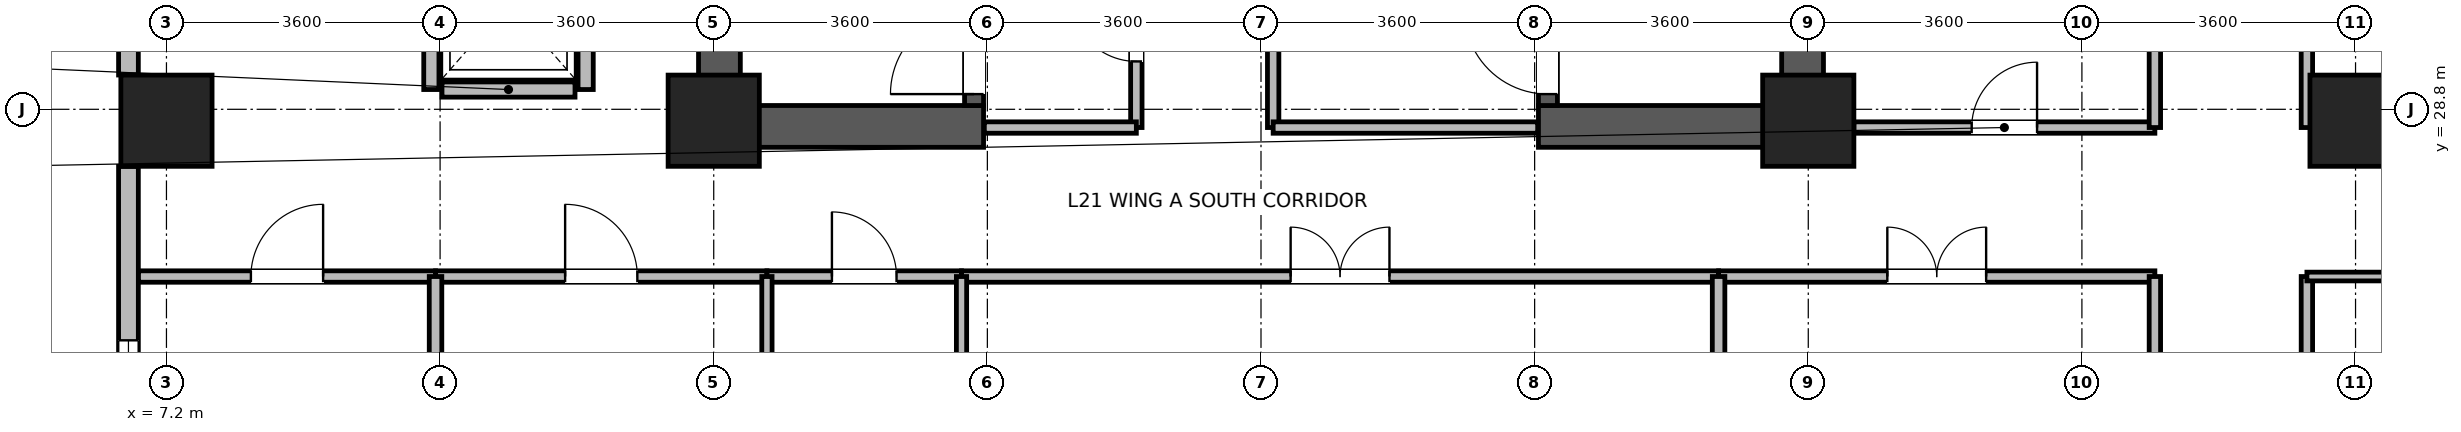
"""IFC4 building model, lengths in metres.
Left out: names, types, materials, properties, quantities, classifications, styles, units other than length and angle.
Written with IfcOpenShell. Run it as: python <this file> out.ifc"""

import sys

from ifc_helpers import new_model, si_unit, direction, frame, frame_2d, origin, origin_2d, place, context, subcontext, project, spatial, rectangle, extrude, source, transform, mapped, element, fill, save


model = new_model("IFC4")
c1 = context("Model", 3, precision=1e-05, world=origin(), true_north=direction((0.0, 1.0)))
c2 = subcontext(c1, "Body", "Model", "MODEL_VIEW")
j1 = project(units=[si_unit("LENGTHUNIT", "METRE"), si_unit("PLANEANGLEUNIT", "RADIAN")], contexts=[c1])
p1 = place(None, origin())
s1 = spatial("IfcSite", under=j1, at=p1, CompositionType="ELEMENT")
p2 = place(p1, origin())
s2 = spatial("IfcBuilding", under=s1, at=p2, CompositionType="ELEMENT")
p3 = place(p2, frame((0.0, 0.0, 86.0)))
s3 = spatial("IfcBuildingStorey", under=s2, at=p3, CompositionType="ELEMENT", Elevation=86.0)
for number, where, z_axis, x_axis in (
    (1, (14.475, 28.3, 0.0), (0.0, 0.0, 1.0), (0.0, 1.0, 0.0)),
    (2, (28.725, 28.3, 0.0), (0.0, 0.0, 1.0), (0.0, 1.0, 0.0)),
):
    element("IfcWall", number, at=place(p3, frame(where, z_axis=z_axis, x_axis=x_axis)), inside=s3, PredefinedType="SHEAR", context=c2, shape_type="SweptSolid", body=[
        extrude(rectangle(XDim=8.1, YDim=0.55, at=frame_2d((4.05, 0.0))), origin(), (0.0, 0.0, 1.0), 3.45),
    ])
for number, where, z_axis, x_axis in (
    (3, (14.75, 28.575, 0.0), (0.0, 0.0, 1.0), (1.0, 0.0, 0.0)),
    (4, (25.25, 28.575, 0.0), (0.0, 0.0, 1.0), (1.0, 0.0, 0.0)),
):
    element("IfcWall", number, at=place(p3, frame(where, z_axis=z_axis, x_axis=x_axis)), inside=s3, PredefinedType="SHEAR", context=c2, shape_type="SweptSolid", body=[
        extrude(rectangle(XDim=3.2, YDim=0.55, at=frame_2d((1.6, 0.0))), origin(), (0.0, 0.0, 1.0), 3.45),
    ])
p4 = place(p3, frame((17.825, 28.85, 0.0), z_axis=(0.0, 0.0, 1.0), x_axis=(0.0, 1.0, 0.0)))
e5 = element("IfcWall", 5, at=p4, inside=s3, PredefinedType="SHEAR", context=c2, shape_type="SweptSolid", body=[
    extrude(rectangle(XDim=7.0, YDim=0.25, at=frame_2d((3.5, 0.0))), origin(), (0.0, 0.0, 1.0), 3.45),
])
p5 = place(p4, frame((0.15, 0.0, 0.0)))
e6 = element("IfcOpeningElement", 6, at=p5, cuts=e5, PredefinedType="OPENING", context=c2, shape_type="SweptSolid", body=[
    extrude(rectangle(XDim=1.1, YDim=2.08, at=frame_2d((0.55, 1.04))), frame((0.0, 0.135, 0.0), z_axis=(0.0, -1.0, 0.0), x_axis=(1.0, 0.0, 0.0)), (0.0, 0.0, 1.0), 0.27),
])
p6 = place(p3, frame((25.375, 28.85, 0.0), z_axis=(0.0, 0.0, 1.0), x_axis=(0.0, 1.0, 0.0)))
e7 = element("IfcWall", 7, at=p6, inside=s3, PredefinedType="SHEAR", context=c2, shape_type="SweptSolid", body=[
    extrude(rectangle(XDim=7.0, YDim=0.25, at=frame_2d((3.5, 0.0))), origin(), (0.0, 0.0, 1.0), 3.45),
])
p7 = place(p6, frame((0.15, 0.0, 0.0)))
e8 = element("IfcOpeningElement", 8, at=p7, cuts=e7, PredefinedType="OPENING", context=c2, shape_type="SweptSolid", body=[
    extrude(rectangle(XDim=1.1, YDim=2.08, at=frame_2d((0.55, 1.04))), frame((0.0, 0.135, 0.0), z_axis=(0.0, -1.0, 0.0), x_axis=(1.0, 0.0, 0.0)), (0.0, 0.0, 1.0), 0.27),
])
m1 = source(origin(), c2, "Body", "SweptSolid", [
    extrude(rectangle(XDim=1.2, YDim=1.2, at=origin_2d()), origin(), (0.0, 0.0, 1.0), 3.7),
])
for number, where, z_axis, x_axis in (
    (9, (7.2, 28.65, 0.0), (0.0, 0.0, 1.0), (1.0, 0.0, 0.0)),
    (10, (14.4, 28.65, 0.0), (0.0, 0.0, 1.0), (1.0, 0.0, 0.0)),
    (11, (28.8, 28.65, 0.0), (0.0, 0.0, 1.0), (1.0, 0.0, 0.0)),
    (12, (36.0, 28.65, 0.0), (0.0, 0.0, 1.0), (1.0, 0.0, 0.0)),
):
    element("IfcColumn", number, at=place(p3, frame(where, z_axis=z_axis, x_axis=x_axis)), inside=s3, PredefinedType="COLUMN", context=c2, shape_type="MappedRepresentation", body=[
        mapped(m1, transform((0.0, 0.0, 0.0), x_axis=(1.0, 0.0, 0.0), y_axis=(0.0, 1.0, 0.0), z_axis=(0.0, 0.0, 1.0), scale=1.0)),
    ])
p8 = place(p3, frame((6.7, 29.251, 0.0), z_axis=(0.0, 0.0, 1.0), x_axis=(0.0, 1.0, 0.0)))
e13 = element("IfcWall", 13, at=p8, inside=s3, PredefinedType="STANDARD", context=c2, shape_type="SweptSolid", body=[
    extrude(rectangle(XDim=6.298, YDim=0.26, at=frame_2d((3.149, 0.0))), origin(), (0.0, 0.0, 1.0), 3.43),
])
p9 = place(p8, frame((0.675, 0.0, 0.85)))
e14 = element("IfcOpeningElement", 14, at=p9, cuts=e13, PredefinedType="OPENING", context=c2, shape_type="SweptSolid", body=[
    extrude(rectangle(XDim=1.8, YDim=1.85, at=frame_2d((0.9, 0.925))), frame((0.0, 0.14, 0.0), z_axis=(0.0, -1.0, 0.0), x_axis=(1.0, 0.0, 0.0)), (0.0, 0.0, 1.0), 0.28),
])
p10 = place(p8, frame((3.823, 0.0, 0.85)))
e15 = element("IfcOpeningElement", 15, at=p10, cuts=e13, PredefinedType="OPENING", context=c2, shape_type="SweptSolid", body=[
    extrude(rectangle(XDim=1.8, YDim=1.85, at=frame_2d((0.9, 0.925))), frame((0.0, 0.14, 0.0), z_axis=(0.0, -1.0, 0.0), x_axis=(1.0, 0.0, 0.0)), (0.0, 0.0, 1.0), 0.28),
])
p11 = place(p3, frame((6.7, 21.47, 0.0), z_axis=(0.0, 0.0, 1.0), x_axis=(0.0, 1.0, 0.0)))
e16 = element("IfcWall", 16, at=p11, inside=s3, PredefinedType="STANDARD", context=c2, shape_type="SweptSolid", body=[
    extrude(rectangle(XDim=6.579, YDim=0.26, at=frame_2d((3.29, 0.0))), origin(), (0.0, 0.0, 1.0), 3.43),
])
p12 = place(p11, frame((0.745, 0.0, 0.85)))
e17 = element("IfcOpeningElement", 17, at=p12, cuts=e16, PredefinedType="OPENING", context=c2, shape_type="SweptSolid", body=[
    extrude(rectangle(XDim=1.8, YDim=1.85, at=frame_2d((0.9, 0.925))), frame((0.0, 0.14, 0.0), z_axis=(0.0, -1.0, 0.0), x_axis=(1.0, 0.0, 0.0)), (0.0, 0.0, 1.0), 0.28),
])
p13 = place(p11, frame((3.341, 0.0, 0.85)))
e18 = element("IfcOpeningElement", 18, at=p13, cuts=e16, PredefinedType="OPENING", context=c2, shape_type="SweptSolid", body=[
    extrude(rectangle(XDim=0.95, YDim=1.75, at=frame_2d((0.475, 0.875))), frame((0.0, 0.14, 0.0), z_axis=(0.0, -1.0, 0.0), x_axis=(1.0, 0.0, 0.0)), (0.0, 0.0, 1.0), 0.28),
])
p14 = place(p3, frame((10.825, 29.06, 0.0), z_axis=(0.0, 0.0, 1.0), x_axis=(1.0, 0.0, 0.0)))
e19 = element("IfcWall", 19, at=p14, inside=s3, PredefinedType="PARTITIONING", context=c2, shape_type="SweptSolid", body=[
    extrude(rectangle(XDim=1.75, YDim=0.2, at=frame_2d((0.875, 0.0))), origin(), (0.0, 0.0, 1.0), 3.43),
])
for number, where, z_axis, x_axis in (
    (20, (10.685, 29.06, 0.0), (0.0, 0.0, 1.0), (0.0, 1.0, 0.0)),
    (21, (12.715, 29.06, 0.0), (0.0, 0.0, 1.0), (0.0, 1.0, 0.0)),
):
    element("IfcWall", number, at=place(p3, frame(where, z_axis=z_axis, x_axis=x_axis)), inside=s3, PredefinedType="PARTITIONING", context=c2, shape_type="SweptSolid", body=[
        extrude(rectangle(XDim=2.28, YDim=0.2, at=frame_2d((1.14, 0.0))), origin(), (0.0, 0.0, 1.0), 3.43),
    ])
p15 = place(p3, frame((17.66, 26.6, 0.0), z_axis=(0.0, 0.0, 1.0), x_axis=(1.0, 0.0, 0.0)))
e22 = element("IfcWall", 22, at=p15, inside=s3, PredefinedType="PARTITIONING", context=c2, shape_type="SweptSolid", body=[
    extrude(rectangle(XDim=9.96, YDim=0.15, at=frame_2d((4.98, 0.0))), origin(), (0.0, 0.0, 1.0), 3.43),
])
p16 = place(p15, frame((4.33, 0.0, 0.0)))
e23 = element("IfcOpeningElement", 23, at=p16, cuts=e22, PredefinedType="OPENING", context=c2, shape_type="SweptSolid", body=[
    extrude(rectangle(XDim=1.3, YDim=2.12, at=frame_2d((0.65, 1.06))), frame((0.0, 0.085, 0.0), z_axis=(0.0, -1.0, 0.0), x_axis=(1.0, 0.0, 0.0)), (0.0, 0.0, 1.0), 0.17),
])
p17 = place(p3, frame((35.36, 16.96, 0.0), z_axis=(0.0, 0.0, 1.0), x_axis=(0.0, 1.0, 0.0)))
e24 = element("IfcWall", 24, at=p17, inside=s3, PredefinedType="PARTITIONING", context=c2, shape_type="SweptSolid", body=[
    extrude(rectangle(XDim=9.64, YDim=0.15, at=frame_2d((4.82, 0.0))), origin(), (0.0, 0.0, 1.0), 3.43),
])
p18 = place(p17, frame((2.435, 0.0, 0.0)))
e25 = element("IfcOpeningElement", 25, at=p18, cuts=e24, PredefinedType="OPENING", context=c2, shape_type="SweptSolid", body=[
    extrude(rectangle(XDim=1.3, YDim=2.12, at=frame_2d((0.65, 1.06))), frame((0.0, 0.085, 0.0), z_axis=(0.0, -1.0, 0.0), x_axis=(1.0, 0.0, 0.0)), (0.0, 0.0, 1.0), 0.17),
])
p19 = place(p3, frame((35.36, 28.56, 0.0), z_axis=(0.0, 0.0, 1.0), x_axis=(0.0, 1.0, 0.0)))
e26 = element("IfcWall", 26, at=p19, inside=s3, PredefinedType="PARTITIONING", context=c2, shape_type="SweptSolid", body=[
    extrude(rectangle(XDim=7.68, YDim=0.15, at=frame_2d((3.84, 0.0))), origin(), (0.0, 0.0, 1.0), 3.43),
])
p20 = place(p19, frame((3.19, 0.0, 0.0)))
e27 = element("IfcOpeningElement", 27, at=p20, cuts=e26, PredefinedType="OPENING", context=c2, shape_type="SweptSolid", body=[
    extrude(rectangle(XDim=1.3, YDim=2.12, at=frame_2d((0.65, 1.06))), frame((0.0, 0.085, 0.0), z_axis=(0.0, -1.0, 0.0), x_axis=(1.0, 0.0, 0.0)), (0.0, 0.0, 1.0), 0.17),
])
p21 = place(p3, frame((27.62, 26.6, 0.0), z_axis=(0.0, 0.0, 1.0), x_axis=(1.0, 0.0, 0.0)))
e28 = element("IfcWall", 28, at=p21, inside=s3, PredefinedType="PARTITIONING", context=c2, shape_type="SweptSolid", body=[
    extrude(rectangle(XDim=5.74, YDim=0.15, at=frame_2d((2.87, 0.0))), origin(), (0.0, 0.0, 1.0), 3.43),
])
p22 = place(p21, frame((2.22, 0.0, 0.0)))
e29 = element("IfcOpeningElement", 29, at=p22, cuts=e28, PredefinedType="OPENING", context=c2, shape_type="SweptSolid", body=[
    extrude(rectangle(XDim=1.3, YDim=2.12, at=frame_2d((0.65, 1.06))), frame((0.0, 0.085, 0.0), z_axis=(0.0, -1.0, 0.0), x_axis=(1.0, 0.0, 0.0)), (0.0, 0.0, 1.0), 0.17),
])
p23 = place(p3, frame((33.36, 21.6, 0.0), z_axis=(0.0, 0.0, 1.0), x_axis=(0.0, 1.0, 0.0)))
e30 = element("IfcWall", 30, at=p23, inside=s3, PredefinedType="PARTITIONING", context=c2, shape_type="SweptSolid", body=[
    extrude(rectangle(XDim=5.0, YDim=0.15, at=frame_2d((2.5, 0.0))), origin(), (0.0, 0.0, 1.0), 3.43),
])
p24 = place(p3, frame((29.4, 28.56, 0.0), z_axis=(0.0, 0.0, 1.0), x_axis=(1.0, 0.0, 0.0)))
e31 = element("IfcWall", 31, at=p24, inside=s3, PredefinedType="PARTITIONING", context=c2, shape_type="SweptSolid", body=[
    extrude(rectangle(XDim=3.96, YDim=0.15, at=frame_2d((1.98, 0.0))), origin(), (0.0, 0.0, 1.0), 2.78),
])
p25 = place(p24, frame((1.55, 0.0, 0.0)))
e32 = element("IfcOpeningElement", 32, at=p25, cuts=e31, PredefinedType="OPENING", context=c2, shape_type="SweptSolid", body=[
    extrude(rectangle(XDim=0.86, YDim=2.02, at=frame_2d((0.43, 1.01))), frame((0.0, 0.085, 0.0), z_axis=(0.0, -1.0, 0.0), x_axis=(1.0, 0.0, 0.0)), (0.0, 0.0, 1.0), 0.17),
])
p26 = place(p3, frame((10.74, 26.6, 0.0), z_axis=(0.0, 0.0, 1.0), x_axis=(1.0, 0.0, 0.0)))
e33 = element("IfcWall", 33, at=p26, inside=s3, PredefinedType="PARTITIONING", context=c2, shape_type="SweptSolid", body=[
    extrude(rectangle(XDim=4.36, YDim=0.15, at=frame_2d((2.18, 0.0))), origin(), (0.0, 0.0, 1.0), 3.43),
])
p27 = place(p26, frame((1.705, 0.0, 0.0)))
e34 = element("IfcOpeningElement", 34, at=p27, cuts=e33, PredefinedType="OPENING", context=c2, shape_type="SweptSolid", body=[
    extrude(rectangle(XDim=0.95, YDim=2.1, at=frame_2d((0.475, 1.05))), frame((0.0, 0.085, 0.0), z_axis=(0.0, -1.0, 0.0), x_axis=(1.0, 0.0, 0.0)), (0.0, 0.0, 1.0), 0.17),
])
p28 = place(p3, frame((6.832, 26.6, 0.0), z_axis=(0.0, 0.0, 1.0), x_axis=(1.0, 0.0, 0.0)))
e35 = element("IfcWall", 35, at=p28, inside=s3, PredefinedType="PARTITIONING", context=c2, shape_type="SweptSolid", body=[
    extrude(rectangle(XDim=3.908, YDim=0.15, at=frame_2d((1.954, 0.0))), origin(), (0.0, 0.0, 1.0), 3.43),
])
p29 = place(p28, frame((1.479, 0.0, 0.0)))
e36 = element("IfcOpeningElement", 36, at=p29, cuts=e35, PredefinedType="OPENING", context=c2, shape_type="SweptSolid", body=[
    extrude(rectangle(XDim=0.95, YDim=2.1, at=frame_2d((0.475, 1.05))), frame((0.0, 0.085, 0.0), z_axis=(0.0, -1.0, 0.0), x_axis=(1.0, 0.0, 0.0)), (0.0, 0.0, 1.0), 0.17),
])
p30 = place(p3, frame((33.36, 28.56, 0.0), z_axis=(0.0, 0.0, 1.0), x_axis=(0.0, 1.0, 0.0)))
e37 = element("IfcWall", 37, at=p30, inside=s3, PredefinedType="PARTITIONING", context=c2, shape_type="SweptSolid", body=[
    extrude(rectangle(XDim=3.84, YDim=0.15, at=frame_2d((1.92, 0.0))), origin(), (0.0, 0.0, 1.0), 3.43),
])
p31 = place(p3, frame((19.96, 28.56, 0.0), z_axis=(0.0, 0.0, 1.0), x_axis=(0.0, 1.0, 0.0)))
e38 = element("IfcWall", 38, at=p31, inside=s3, PredefinedType="PARTITIONING", context=c2, shape_type="SweptSolid", body=[
    extrude(rectangle(XDim=2.6, YDim=0.15, at=frame_2d((1.3, 0.0))), origin(), (0.0, 0.0, 1.0), 3.43),
])
p32 = place(p31, frame((0.87, 0.0, 0.0)))
e39 = element("IfcOpeningElement", 39, at=p32, cuts=e38, PredefinedType="OPENING", context=c2, shape_type="SweptSolid", body=[
    extrude(rectangle(XDim=0.86, YDim=2.02, at=frame_2d((0.43, 1.01))), frame((0.0, 0.085, 0.0), z_axis=(0.0, -1.0, 0.0), x_axis=(1.0, 0.0, 0.0)), (0.0, 0.0, 1.0), 0.17),
])
p33 = place(p3, frame((15.1, 26.6, 0.0), z_axis=(0.0, 0.0, 1.0), x_axis=(1.0, 0.0, 0.0)))
e40 = element("IfcWall", 40, at=p33, inside=s3, PredefinedType="PARTITIONING", context=c2, shape_type="SweptSolid", body=[
    extrude(rectangle(XDim=2.56, YDim=0.15, at=frame_2d((1.28, 0.0))), origin(), (0.0, 0.0, 1.0), 3.43),
])
p34 = place(p33, frame((0.855, 0.0, 0.0)))
e41 = element("IfcOpeningElement", 41, at=p34, cuts=e40, PredefinedType="OPENING", context=c2, shape_type="SweptSolid", body=[
    extrude(rectangle(XDim=0.85, YDim=2.04, at=frame_2d((0.425, 1.02))), frame((0.0, 0.085, 0.0), z_axis=(0.0, -1.0, 0.0), x_axis=(1.0, 0.0, 0.0)), (0.0, 0.0, 1.0), 0.17),
])
p35 = place(p3, frame((17.96, 28.56, 0.0), z_axis=(0.0, 0.0, 1.0), x_axis=(1.0, 0.0, 0.0)))
e42 = element("IfcWall", 42, at=p35, inside=s3, PredefinedType="PARTITIONING", context=c2, shape_type="SweptSolid", body=[
    extrude(rectangle(XDim=2.0, YDim=0.15, at=frame_2d((1.0, 0.0))), origin(), (0.0, 0.0, 1.0), 2.23),
])
p36 = place(p3, frame((10.74, 21.732, 0.0), z_axis=(0.0, 0.0, 1.0), x_axis=(0.0, 1.0, 0.0)))
e43 = element("IfcWall", 43, at=p36, inside=s3, PredefinedType="PARTITIONING", context=c2, shape_type="SweptSolid", body=[
    extrude(rectangle(XDim=4.868, YDim=0.165, at=frame_2d((2.434, 0.0))), origin(), (0.0, 0.0, 1.0), 3.43),
])
for number, where, z_axis, x_axis in (
    (44, (15.1, 21.732, 0.0), (0.0, 0.0, 1.0), (0.0, 1.0, 0.0)),
    (45, (17.66, 21.732, 0.0), (0.0, 0.0, 1.0), (0.0, 1.0, 0.0)),
):
    element("IfcWall", number, at=place(p3, frame(where, z_axis=z_axis, x_axis=x_axis)), inside=s3, PredefinedType="PARTITIONING", context=c2, shape_type="SweptSolid", body=[
        extrude(rectangle(XDim=4.868, YDim=0.135, at=frame_2d((2.434, 0.0))), origin(), (0.0, 0.0, 1.0), 3.43),
    ])
p37 = place(p3, frame((27.62, 21.732, 0.0), z_axis=(0.0, 0.0, 1.0), x_axis=(0.0, 1.0, 0.0)))
e46 = element("IfcWall", 46, at=p37, inside=s3, PredefinedType="PARTITIONING", context=c2, shape_type="SweptSolid", body=[
    extrude(rectangle(XDim=4.868, YDim=0.165, at=frame_2d((2.434, 0.0))), origin(), (0.0, 0.0, 1.0), 3.43),
])
p38 = place(p3, frame((21.76, 28.56, 0.0), z_axis=(0.0, 0.0, 1.0), x_axis=(0.0, 1.0, 0.0)))
e47 = element("IfcWall", 47, at=p38, inside=s3, PredefinedType="PARTITIONING", context=c2, shape_type="SweptSolid", body=[
    extrude(rectangle(XDim=4.6, YDim=0.15, at=frame_2d((2.3, 0.0))), origin(), (0.0, 0.0, 1.0), 3.43),
])
p39 = place(p38, frame((1.55, 0.0, 0.0)))
e48 = element("IfcOpeningElement", 48, at=p39, cuts=e47, PredefinedType="OPENING", context=c2, shape_type="SweptSolid", body=[
    extrude(rectangle(XDim=1.5, YDim=2.1, at=frame_2d((0.75, 1.05))), frame((0.0, 0.085, 0.0), z_axis=(0.0, -1.0, 0.0), x_axis=(1.0, 0.0, 0.0)), (0.0, 0.0, 1.0), 0.17),
])
p40 = place(p3, frame((35.36, 26.6, 0.0), z_axis=(0.0, 0.0, 1.0), x_axis=(1.0, 0.0, 0.0)))
e49 = element("IfcWall", 49, at=p40, inside=s3, PredefinedType="PARTITIONING", context=c2, shape_type="SweptSolid", body=[
    extrude(rectangle(XDim=4.18, YDim=0.115, at=frame_2d((2.09, 0.0))), origin(), (0.0, 0.0, 1.0), 3.43),
])
p41 = place(p3, frame((21.76, 28.56, 0.0), z_axis=(0.0, 0.0, 1.0), x_axis=(1.0, 0.0, 0.0)))
e50 = element("IfcWall", 50, at=p41, inside=s3, PredefinedType="PARTITIONING", context=c2, shape_type="SweptSolid", body=[
    extrude(rectangle(XDim=3.48, YDim=0.15, at=frame_2d((1.74, 0.0))), origin(), (0.0, 0.0, 1.0), 2.23),
])
p42 = place(p13, origin())
e51 = element("IfcWindow", 51, at=p42, inside=s3, PartitioningType="SINGLE_PANEL", PredefinedType="WINDOW", context=c2, shape_type="SweptSolid", body=[
    extrude(rectangle(XDim=0.95, YDim=1.75, at=frame_2d((0.475, 0.875))), frame((0.0, 0.03, 0.0), z_axis=(0.0, -1.0, 0.0), x_axis=(1.0, 0.0, 0.0)), (0.0, 0.0, 1.0), 0.06),
])
fill(e18, e51)
p43 = place(p5, origin())
e52 = element("IfcDoor", 52, at=p43, inside=s3, OperationType="SINGLE_SWING_LEFT", PredefinedType="DOOR", context=c2, shape_type="SweptSolid", body=[
    extrude(rectangle(XDim=1.1, YDim=2.08, at=frame_2d((0.55, 1.04))), frame((0.0, 0.025, 0.0), z_axis=(0.0, -1.0, 0.0), x_axis=(1.0, 0.0, 0.0)), (0.0, 0.0, 1.0), 0.05),
])
fill(e6, e52)
p44 = place(p7, origin())
e53 = element("IfcDoor", 53, at=p44, inside=s3, OperationType="SINGLE_SWING_RIGHT", PredefinedType="DOOR", context=c2, shape_type="SweptSolid", body=[
    extrude(rectangle(XDim=1.1, YDim=2.08, at=frame_2d((0.55, 1.04))), frame((0.0, 0.025, 0.0), z_axis=(0.0, -1.0, 0.0), x_axis=(1.0, 0.0, 0.0)), (0.0, 0.0, 1.0), 0.05),
])
fill(e8, e53)
p45 = place(p16, origin())
e54 = element("IfcDoor", 54, at=p45, inside=s3, OperationType="DOUBLE_DOOR_SINGLE_SWING", PredefinedType="DOOR", context=c2, shape_type="SweptSolid", body=[
    extrude(rectangle(XDim=1.3, YDim=2.12, at=frame_2d((0.65, 1.06))), frame((0.0, 0.025, 0.0), z_axis=(0.0, -1.0, 0.0), x_axis=(1.0, 0.0, 0.0)), (0.0, 0.0, 1.0), 0.05),
])
fill(e23, e54)
p46 = place(p22, origin())
e55 = element("IfcDoor", 55, at=p46, inside=s3, OperationType="DOUBLE_DOOR_SINGLE_SWING", PredefinedType="DOOR", context=c2, shape_type="SweptSolid", body=[
    extrude(rectangle(XDim=1.3, YDim=2.12, at=frame_2d((0.65, 1.06))), frame((0.0, 0.025, 0.0), z_axis=(0.0, -1.0, 0.0), x_axis=(1.0, 0.0, 0.0)), (0.0, 0.0, 1.0), 0.05),
])
fill(e29, e55)
p47 = place(p25, origin())
e56 = element("IfcDoor", 56, at=p47, inside=s3, OperationType="SINGLE_SWING_RIGHT", PredefinedType="DOOR", context=c2, shape_type="SweptSolid", body=[
    extrude(rectangle(XDim=0.86, YDim=2.02, at=frame_2d((0.43, 1.01))), frame((0.0, 0.025, 0.0), z_axis=(0.0, -1.0, 0.0), x_axis=(1.0, 0.0, 0.0)), (0.0, 0.0, 1.0), 0.05),
])
fill(e32, e56)
p48 = place(p27, origin())
e57 = element("IfcDoor", 57, at=p48, inside=s3, OperationType="SINGLE_SWING_LEFT", PredefinedType="DOOR", context=c2, shape_type="SweptSolid", body=[
    extrude(rectangle(XDim=0.95, YDim=2.1, at=frame_2d((0.475, 1.05))), frame((0.0, 0.025, 0.0), z_axis=(0.0, -1.0, 0.0), x_axis=(1.0, 0.0, 0.0)), (0.0, 0.0, 1.0), 0.05),
])
fill(e34, e57)
p49 = place(p29, origin())
e58 = element("IfcDoor", 58, at=p49, inside=s3, OperationType="SINGLE_SWING_RIGHT", PredefinedType="DOOR", context=c2, shape_type="SweptSolid", body=[
    extrude(rectangle(XDim=0.95, YDim=2.1, at=frame_2d((0.475, 1.05))), frame((0.0, 0.025, 0.0), z_axis=(0.0, -1.0, 0.0), x_axis=(1.0, 0.0, 0.0)), (0.0, 0.0, 1.0), 0.05),
])
fill(e36, e58)
p50 = place(p32, origin())
e59 = element("IfcDoor", 59, at=p50, inside=s3, OperationType="SINGLE_SWING_RIGHT", PredefinedType="DOOR", context=c2, shape_type="SweptSolid", body=[
    extrude(rectangle(XDim=0.86, YDim=2.02, at=frame_2d((0.43, 1.01))), frame((0.0, 0.025, 0.0), z_axis=(0.0, -1.0, 0.0), x_axis=(1.0, 0.0, 0.0)), (0.0, 0.0, 1.0), 0.05),
])
fill(e39, e59)
p51 = place(p34, origin())
e60 = element("IfcDoor", 60, at=p51, inside=s3, OperationType="SINGLE_SWING_LEFT", PredefinedType="DOOR", context=c2, shape_type="SweptSolid", body=[
    extrude(rectangle(XDim=0.85, YDim=2.04, at=frame_2d((0.425, 1.02))), frame((0.0, 0.025, 0.0), z_axis=(0.0, -1.0, 0.0), x_axis=(1.0, 0.0, 0.0)), (0.0, 0.0, 1.0), 0.05),
])
fill(e41, e60)
save(model, sys.argv[1])
